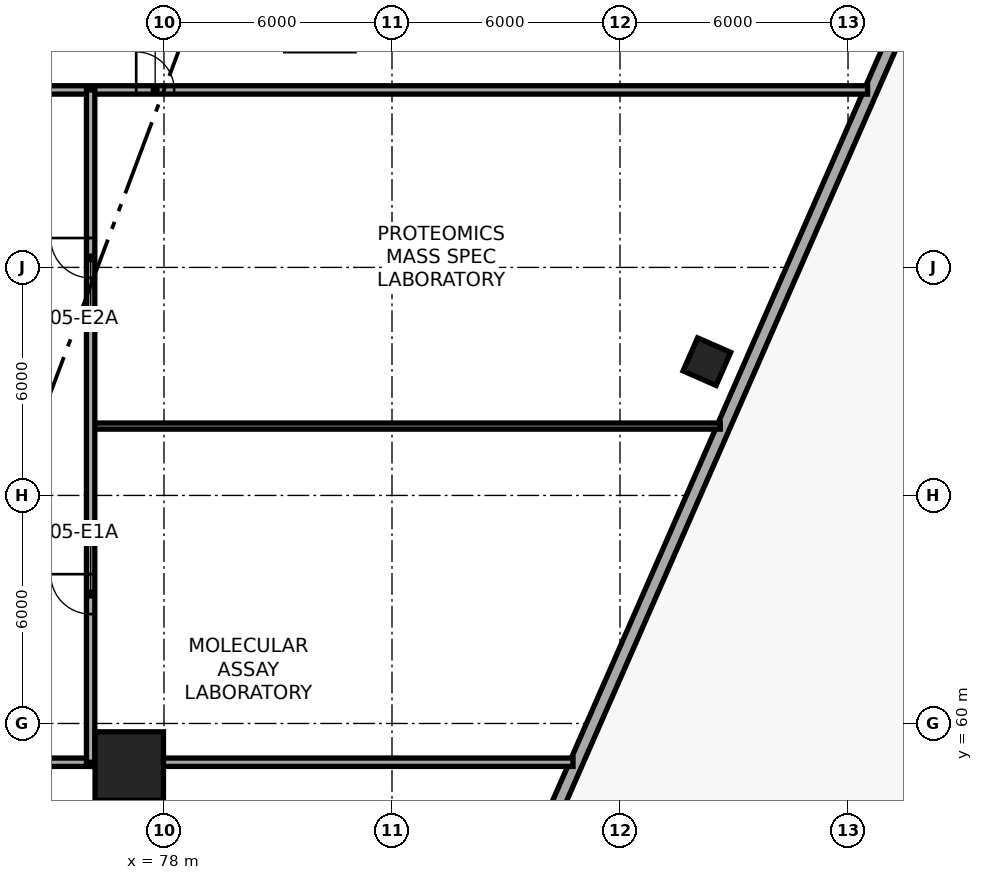
"""IFC4 building model, lengths in metres.
Left out: names, types, materials, properties, quantities, classifications, styles, units other than length and angle.
Written with IfcOpenShell. Run it as: python <this file> out.ifc"""

import sys

from ifc_helpers import new_model, si_unit, direction, frame, frame_2d, origin, origin_2d, place, context, subcontext, project, spatial, rectangle, extrude, element, fill, save


model = new_model("IFC4")
c1 = context("Model", 3, precision=1e-05, world=origin(), true_north=direction((0.0, 1.0)))
c2 = subcontext(c1, "Body", "Model", "MODEL_VIEW")
j1 = project(units=[si_unit("LENGTHUNIT", "METRE"), si_unit("PLANEANGLEUNIT", "RADIAN")], contexts=[c1])
p1 = place(None, origin())
s1 = spatial("IfcSite", under=j1, at=p1, CompositionType="ELEMENT")
p2 = place(p1, origin())
s2 = spatial("IfcBuilding", under=s1, at=p2, CompositionType="ELEMENT")
p3 = place(p2, frame((0.0, 0.0, 22.8)))
s3 = spatial("IfcBuildingStorey", under=s2, at=p3, CompositionType="ELEMENT", Elevation=22.8)
p4 = place(p3, frame((77.086, 58.88, 0.0), z_axis=(0.0, 0.0, 1.0), x_axis=(1.0, 0.0, 0.0)))
e1 = element("IfcColumn", 1, at=p4, inside=s3, PredefinedType="COLUMN", context=c2, shape_type="SweptSolid", body=[
    extrude(rectangle(XDim=1.8, YDim=1.8, at=origin_2d()), origin(), (0.0, 0.0, 1.0), 3.65),
])
p5 = place(p3, frame((92.357, 69.531, 0.003), z_axis=(-0.039296319589, -0.005757212069, 0.99921101564), x_axis=(0.963703994598, -0.264483260231, 0.036376034065)))
e2 = element("IfcColumn", 2, at=p5, inside=s3, PredefinedType="COLUMN", context=c2, shape_type="SweptSolid", body=[
    extrude(rectangle(XDim=0.95, YDim=0.95, at=origin_2d()), origin(), (0.0, 0.0, 1.0), 3.647),
])
p6 = place(p3, frame((100.375, 85.267, 0.0), z_axis=(0.0, 0.0, 1.0), x_axis=(-0.401347685244, -0.91592578059, 0.0)))
e3 = element("IfcWall", 3, at=p6, inside=s3, PredefinedType="STANDARD", context=c2, shape_type="SweptSolid", body=[
    extrude(rectangle(XDim=73.781, YDim=0.34, at=frame_2d((36.891, 0.0))), origin(), (0.0, 0.0, 1.0), 0.85),
])
p7 = place(p3, frame((35.486, 76.67, 0.0), z_axis=(0.0, 0.0, 1.0), x_axis=(1.0, 0.0, 0.0)))
e4 = element("IfcWall", 4, at=p7, inside=s3, PredefinedType="PARTITIONING", context=c2, shape_type="SweptSolid", body=[
    extrude(rectangle(XDim=61.029, YDim=0.22, at=frame_2d((30.514, 0.0))), origin(), (0.0, 0.0, 1.0), 2.505),
])
p8 = place(p7, frame((24.074, 0.0, 0.0)))
e5 = element("IfcOpeningElement", 5, at=p8, cuts=e4, PredefinedType="OPENING", context=c2, shape_type="SweptSolid", body=[
    extrude(rectangle(XDim=0.98, YDim=2.1, at=frame_2d((0.49, 1.05))), frame((0.0, 0.12, 0.0), z_axis=(0.0, -1.0, 0.0), x_axis=(1.0, 0.0, 0.0)), (0.0, 0.0, 1.0), 0.24),
])
p9 = place(p7, frame((26.899, 0.0, 0.0)))
e6 = element("IfcOpeningElement", 6, at=p9, cuts=e4, PredefinedType="OPENING", context=c2, shape_type="SweptSolid", body=[
    extrude(rectangle(XDim=0.98, YDim=2.1, at=frame_2d((0.49, 1.05))), frame((0.0, 0.12, 0.0), z_axis=(0.0, -1.0, 0.0), x_axis=(1.0, 0.0, 0.0)), (0.0, 0.0, 1.0), 0.24),
])
p10 = place(p7, frame((11.117, 0.0, 0.0)))
e7 = element("IfcOpeningElement", 7, at=p10, cuts=e4, PredefinedType="OPENING", context=c2, shape_type="SweptSolid", body=[
    extrude(rectangle(XDim=1.0, YDim=2.1, at=frame_2d((0.5, 1.05))), frame((0.0, 0.12, 0.0), z_axis=(0.0, -1.0, 0.0), x_axis=(1.0, 0.0, 0.0)), (0.0, 0.0, 1.0), 0.24),
])
p11 = place(p7, frame((41.783, 0.0, 0.0)))
e8 = element("IfcOpeningElement", 8, at=p11, cuts=e4, PredefinedType="OPENING", context=c2, shape_type="SweptSolid", body=[
    extrude(rectangle(XDim=1.0, YDim=2.1, at=frame_2d((0.5, 1.05))), frame((0.0, 0.12, 0.0), z_axis=(0.0, -1.0, 0.0), x_axis=(1.0, 0.0, 0.0)), (0.0, 0.0, 1.0), 0.24),
])
p12 = place(p3, frame((55.23, 58.98, 0.0), z_axis=(0.0, 0.0, 1.0), x_axis=(1.0, 0.0, 0.0)))
e9 = element("IfcWall", 9, at=p12, inside=s3, PredefinedType="PARTITIONING", context=c2, shape_type="SweptSolid", body=[
    extrude(rectangle(XDim=33.533, YDim=0.22, at=frame_2d((16.767, 0.0))), origin(), (0.0, 0.0, 1.0), 2.505),
])
p13 = place(p12, frame((11.0, 0.0, 0.0)))
e10 = element("IfcOpeningElement", 10, at=p13, cuts=e9, PredefinedType="OPENING", context=c2, shape_type="SweptSolid", body=[
    extrude(rectangle(XDim=1.5, YDim=2.2, at=frame_2d((0.75, 1.1))), frame((0.0, 0.12, 0.0), z_axis=(0.0, -1.0, 0.0), x_axis=(1.0, 0.0, 0.0)), (0.0, 0.0, 1.0), 0.24),
])
p14 = place(p3, frame((76.07, 67.825, 0.0), z_axis=(0.0, 0.0, 1.0), x_axis=(1.0, 0.0, 0.0)))
e11 = element("IfcWall", 11, at=p14, inside=s3, PredefinedType="PARTITIONING", context=c2, shape_type="SweptSolid", body=[
    extrude(rectangle(XDim=16.569, YDim=0.16, at=frame_2d((8.284, 0.0))), origin(), (0.0, 0.0, 1.0), 2.505),
])
p15 = place(p3, frame((76.07, 58.98, 0.0), z_axis=(0.0, 0.0, 1.0), x_axis=(0.0, 1.0, 0.0)))
e12 = element("IfcWall", 12, at=p15, inside=s3, PredefinedType="PARTITIONING", context=c2, shape_type="SweptSolid", body=[
    extrude(rectangle(XDim=17.69, YDim=0.22, at=frame_2d((8.845, 0.0))), origin(), (0.0, 0.0, 1.0), 2.555),
])
p16 = place(p15, frame((3.898, 0.0, 0.0)))
e13 = element("IfcOpeningElement", 13, at=p16, cuts=e12, PredefinedType="OPENING", context=c2, shape_type="SweptSolid", body=[
    extrude(rectangle(XDim=1.05, YDim=2.15, at=frame_2d((0.525, 1.075))), frame((0.0, 0.12, 0.0), z_axis=(0.0, -1.0, 0.0), x_axis=(1.0, 0.0, 0.0)), (0.0, 0.0, 1.0), 0.24),
])
p17 = place(p15, frame((12.743, 0.0, 0.0)))
e14 = element("IfcOpeningElement", 14, at=p17, cuts=e12, PredefinedType="OPENING", context=c2, shape_type="SweptSolid", body=[
    extrude(rectangle(XDim=1.05, YDim=2.15, at=frame_2d((0.525, 1.075))), frame((0.0, 0.12, 0.0), z_axis=(0.0, -1.0, 0.0), x_axis=(1.0, 0.0, 0.0)), (0.0, 0.0, 1.0), 0.24),
])
p18 = place(p11, origin())
e15 = element("IfcDoor", 15, at=p18, inside=s3, OperationType="SINGLE_SWING_LEFT", PredefinedType="DOOR", context=c2, shape_type="SweptSolid", body=[
    extrude(rectangle(XDim=1.0, YDim=2.1, at=frame_2d((0.5, 1.05))), frame((0.0, 0.025, 0.0), z_axis=(0.0, -1.0, 0.0), x_axis=(1.0, 0.0, 0.0)), (0.0, 0.0, 1.0), 0.05),
])
fill(e8, e15)
p19 = place(p16, origin())
e16 = element("IfcDoor", 16, at=p19, inside=s3, OperationType="SINGLE_SWING_RIGHT", PredefinedType="DOOR", context=c2, shape_type="SweptSolid", body=[
    extrude(rectangle(XDim=1.05, YDim=2.15, at=frame_2d((0.525, 1.075))), frame((0.0, 0.025, 0.0), z_axis=(0.0, -1.0, 0.0), x_axis=(1.0, 0.0, 0.0)), (0.0, 0.0, 1.0), 0.05),
])
fill(e13, e16)
p20 = place(p17, origin())
e17 = element("IfcDoor", 17, at=p20, inside=s3, OperationType="SINGLE_SWING_RIGHT", PredefinedType="DOOR", context=c2, shape_type="SweptSolid", body=[
    extrude(rectangle(XDim=1.05, YDim=2.15, at=frame_2d((0.525, 1.075))), frame((0.0, 0.025, 0.0), z_axis=(0.0, -1.0, 0.0), x_axis=(1.0, 0.0, 0.0)), (0.0, 0.0, 1.0), 0.05),
])
fill(e14, e17)
save(model, sys.argv[1])
